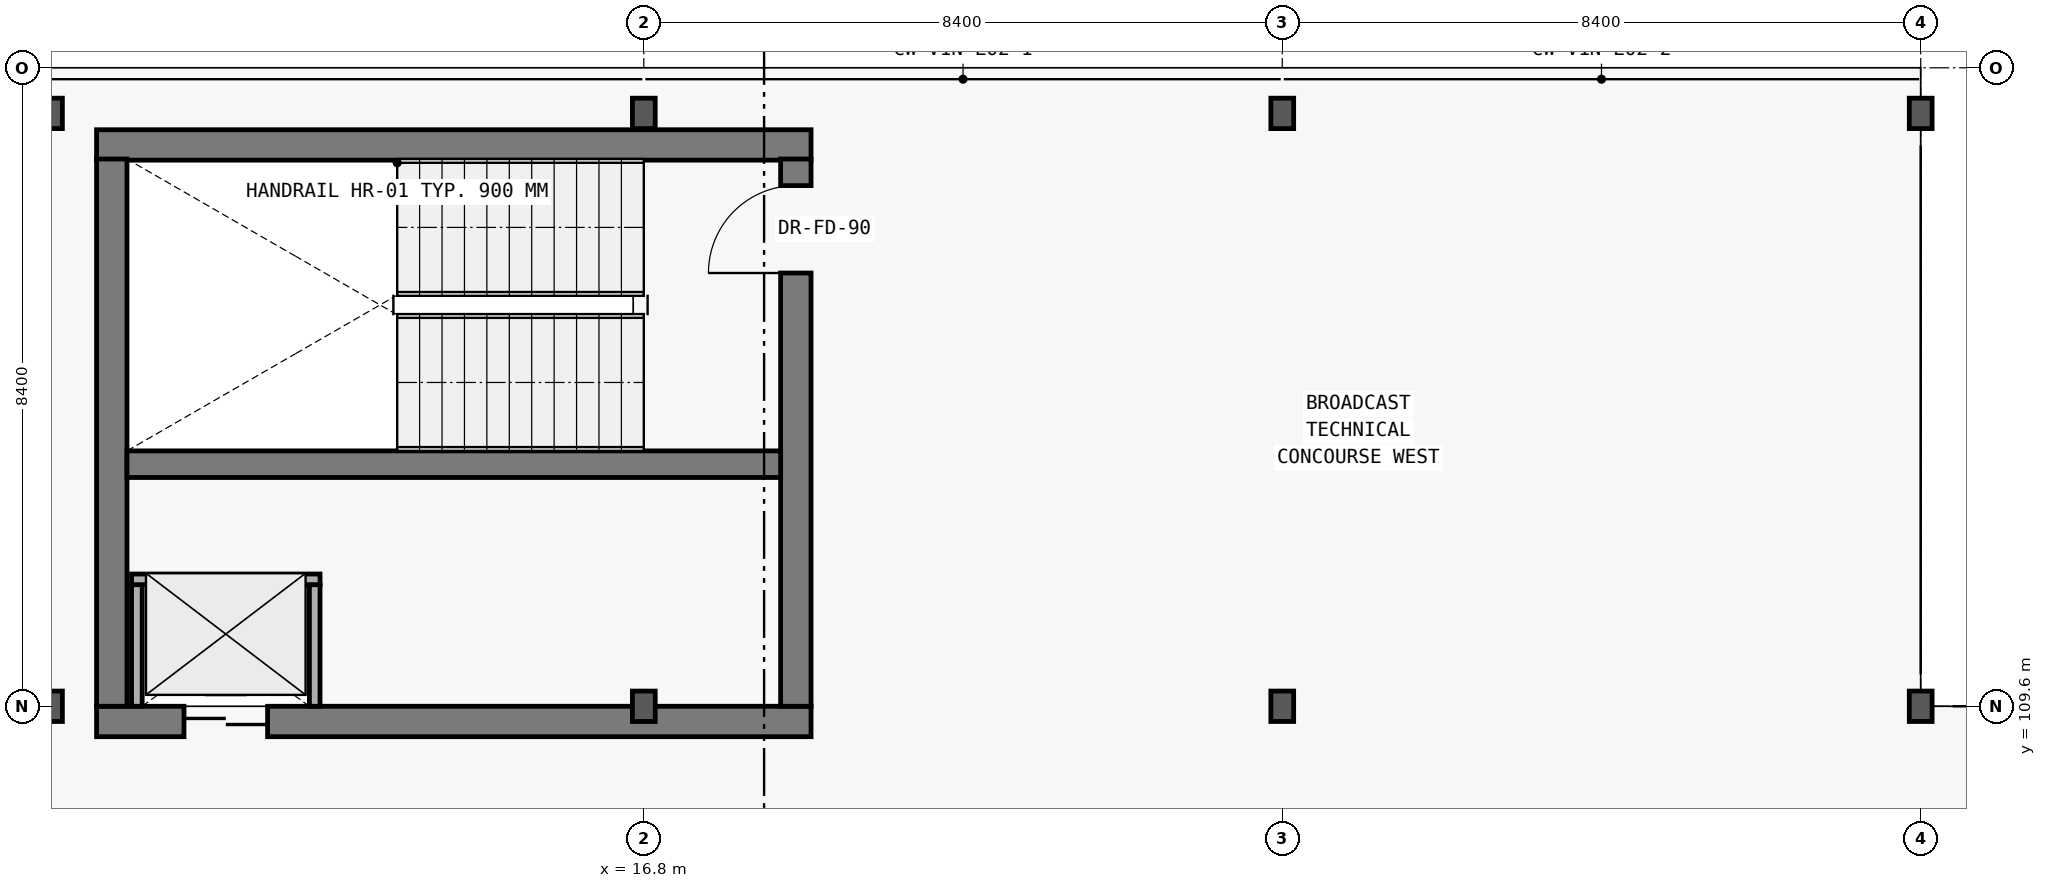
"""IFC4 building model, lengths in metres.
Left out: names, types, materials, properties, quantities, classifications, styles, units other than length and angle.
Written with IfcOpenShell. Run it as: python <this file> out.ifc"""

import sys

from ifc_helpers import new_model, si_unit, direction, frame, frame_2d, origin, origin_2d, place, context, subcontext, project, spatial, rectangle, i_section, extrude, element, fill, save


model = new_model("IFC4")
c1 = context("Model", 3, precision=1e-05, world=origin(), true_north=direction((0.0, 1.0)))
c2 = subcontext(c1, "Body", "Model", "MODEL_VIEW")
j1 = project(units=[si_unit("LENGTHUNIT", "METRE"), si_unit("PLANEANGLEUNIT", "RADIAN")], contexts=[c1])
p1 = place(None, origin())
s1 = spatial("IfcSite", under=j1, at=p1, CompositionType="ELEMENT")
p2 = place(p1, origin())
s2 = spatial("IfcBuilding", under=s1, at=p2, CompositionType="ELEMENT")
p3 = place(p2, frame((0.0, 0.0, 10.8)))
s3 = spatial("IfcBuildingStorey", under=s2, at=p3, CompositionType="ELEMENT", Elevation=10.8)
for number, where, z_axis, x_axis in (
    (1, (9.0, 109.6, 0.0), (0.0, 0.0, 1.0), (1.0, 0.0, 0.0)),
    (2, (9.0, 117.4, 0.0), (0.0, 0.0, 1.0), (1.0, 0.0, 0.0)),
    (3, (16.8, 109.6, 0.0), (0.0, 0.0, 1.0), (1.0, 0.0, 0.0)),
    (4, (16.8, 117.4, 0.0), (0.0, 0.0, 1.0), (1.0, 0.0, 0.0)),
    (5, (25.2, 109.6, 0.0), (0.0, 0.0, 1.0), (1.0, 0.0, 0.0)),
    (6, (25.2, 117.4, 0.0), (0.0, 0.0, 1.0), (1.0, 0.0, 0.0)),
    (7, (33.6, 109.6, 0.0), (0.0, 0.0, 1.0), (1.0, 0.0, 0.0)),
    (8, (33.6, 117.4, 0.0), (0.0, 0.0, 1.0), (1.0, 0.0, 0.0)),
):
    element("IfcColumn", number, at=place(p3, frame(where, z_axis=z_axis, x_axis=x_axis)), inside=s3, PredefinedType="COLUMN", context=c2, shape_type="SweptSolid", body=[
        extrude(i_section(OverallWidth=0.3, OverallDepth=0.4, WebThickness=0.013, FlangeThickness=0.024, at=origin_2d()), origin(), (0.0, 0.0, 1.0), 4.2),
    ])
p4 = place(p3, frame((9.6, 109.4, 0.0), z_axis=(0.0, 0.0, 1.0), x_axis=(1.0, 0.0, 0.0)))
e9 = element("IfcWall", 9, at=p4, inside=s3, PredefinedType="SHEAR", context=c2, shape_type="SweptSolid", body=[
    extrude(rectangle(XDim=9.4, YDim=0.4, at=frame_2d((4.7, 0.0))), origin(), (0.0, 0.0, 1.0), 3.92),
])
p5 = place(p4, frame((1.15, 0.0, 0.0)))
e10 = element("IfcOpeningElement", 10, at=p5, cuts=e9, PredefinedType="OPENING", context=c2, shape_type="SweptSolid", body=[
    extrude(rectangle(XDim=1.1, YDim=2.2, at=frame_2d((0.55, 1.1))), frame((0.0, 0.21, 0.0), z_axis=(0.0, -1.0, 0.0), x_axis=(1.0, 0.0, 0.0)), (0.0, 0.0, 1.0), 0.42),
])
p6 = place(p3, frame((19.0, 116.985, 0.0), z_axis=(0.0, 0.0, 1.0), x_axis=(-1.0, 0.0, 0.0)))
e11 = element("IfcWall", 11, at=p6, inside=s3, PredefinedType="SHEAR", context=c2, shape_type="SweptSolid", body=[
    extrude(rectangle(XDim=9.4, YDim=0.4, at=frame_2d((4.7, 0.0))), origin(), (0.0, 0.0, 1.0), 3.92),
])
p7 = place(p3, frame((9.8, 116.8, 0.0), z_axis=(0.0, 0.0, 1.0), x_axis=(0.0, -1.0, 0.0)))
e12 = element("IfcWall", 12, at=p7, inside=s3, PredefinedType="SHEAR", context=c2, shape_type="SweptSolid", body=[
    extrude(rectangle(XDim=7.2, YDim=0.4, at=frame_2d((3.6, 0.0))), origin(), (0.0, 0.0, 1.0), 3.92),
])
p8 = place(p3, frame((18.8, 109.6, 0.0), z_axis=(0.0, 0.0, 1.0), x_axis=(0.0, 1.0, 0.0)))
e13 = element("IfcWall", 13, at=p8, inside=s3, PredefinedType="SHEAR", context=c2, shape_type="SweptSolid", body=[
    extrude(rectangle(XDim=7.2, YDim=0.4, at=frame_2d((3.6, 0.0))), origin(), (0.0, 0.0, 1.0), 3.92),
])
p9 = place(p8, frame((5.7, 0.0, 0.0)))
e14 = element("IfcOpeningElement", 14, at=p9, cuts=e13, PredefinedType="OPENING", context=c2, shape_type="SweptSolid", body=[
    extrude(rectangle(XDim=1.15, YDim=2.2, at=frame_2d((0.575, 1.1))), frame((0.0, 0.21, 0.0), z_axis=(0.0, -1.0, 0.0), x_axis=(1.0, 0.0, 0.0)), (0.0, 0.0, 1.0), 0.42),
])
p10 = place(p3, frame((10.0, 112.785, 0.0), z_axis=(0.0, 0.0, 1.0), x_axis=(1.0, 0.0, 0.0)))
e15 = element("IfcWall", 15, at=p10, inside=s3, PredefinedType="SHEAR", context=c2, shape_type="SweptSolid", body=[
    extrude(rectangle(XDim=8.6, YDim=0.35, at=frame_2d((4.3, 0.0))), origin(), (0.0, 0.0, 1.0), 3.92),
])
for number, where, z_axis, x_axis in (
    (16, (10.13, 109.6, 0.0), (0.0, 0.0, 1.0), (0.0, 1.0, 0.0)),
    (17, (12.47, 109.6, 0.0), (0.0, 0.0, 1.0), (0.0, 1.0, 0.0)),
):
    element("IfcWall", number, at=place(p3, frame(where, z_axis=z_axis, x_axis=x_axis)), inside=s3, PredefinedType="PARTITIONING", context=c2, shape_type="SweptSolid", body=[
        extrude(rectangle(XDim=1.6, YDim=0.14, at=frame_2d((0.8, 0.0))), origin(), (0.0, 0.0, 1.0), 3.07),
    ])
p11 = place(p3, frame((10.06, 111.27, 0.0), z_axis=(0.0, 0.0, 1.0), x_axis=(1.0, 0.0, 0.0)))
e18 = element("IfcWall", 18, at=p11, inside=s3, PredefinedType="PARTITIONING", context=c2, shape_type="SweptSolid", body=[
    extrude(rectangle(XDim=2.48, YDim=0.14, at=frame_2d((1.24, 0.0))), origin(), (0.0, 0.0, 1.0), 3.07),
])
p12 = place(p9, origin())
e19 = element("IfcDoor", 19, at=p12, inside=s3, OperationType="SINGLE_SWING_LEFT", PredefinedType="DOOR", context=c2, shape_type="SweptSolid", body=[
    extrude(rectangle(XDim=1.15, YDim=2.2, at=frame_2d((0.575, 1.1))), frame((0.0, 0.025, 0.0), z_axis=(0.0, -1.0, 0.0), x_axis=(1.0, 0.0, 0.0)), (0.0, 0.0, 1.0), 0.05),
])
fill(e14, e19)
p13 = place(p5, origin())
e20 = element("IfcDoor", 20, at=p13, inside=s3, OperationType="DOUBLE_DOOR_SLIDING", PredefinedType="DOOR", context=c2, shape_type="SweptSolid", body=[
    extrude(rectangle(XDim=1.1, YDim=2.2, at=frame_2d((0.55, 1.1))), frame((0.0, 0.025, 0.0), z_axis=(0.0, -1.0, 0.0), x_axis=(1.0, 0.0, 0.0)), (0.0, 0.0, 1.0), 0.05),
])
fill(e10, e20)
save(model, sys.argv[1])
